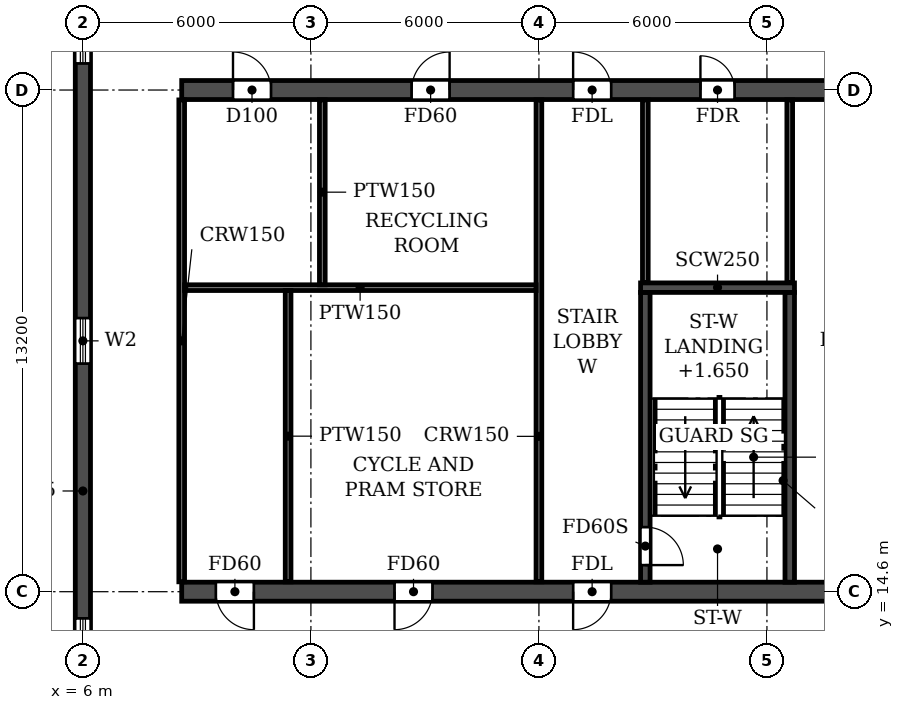
"""IFC4 building model, lengths in metres.
Left out: names, types, materials, properties, quantities, classifications, styles, units other than length and angle.
Written with IfcOpenShell. Run it as: python <this file> out.ifc"""

import sys

from ifc_helpers import new_model, si_unit, direction, frame, frame_2d, origin, place, context, subcontext, project, spatial, rectangle, extrude, element, fill, save


model = new_model("IFC4")
c1 = context("Model", 3, precision=1e-05, world=origin(), true_north=direction((0.0, 1.0)))
c2 = subcontext(c1, "Body", "Model", "MODEL_VIEW")
j1 = project(units=[si_unit("LENGTHUNIT", "METRE"), si_unit("PLANEANGLEUNIT", "RADIAN")], contexts=[c1])
p1 = place(None, origin())
s1 = spatial("IfcSite", under=j1, at=p1, CompositionType="ELEMENT")
p2 = place(p1, origin())
s2 = spatial("IfcBuilding", under=s1, at=p2, CompositionType="ELEMENT")
p3 = place(p2, frame((0.0, 0.0, 102.6)))
s3 = spatial("IfcBuildingStorey", under=s2, at=p3, CompositionType="ELEMENT", Elevation=102.6)
p4 = place(p3, frame((6.0, 4.683, 0.0), z_axis=(0.0, 0.0, 1.0), x_axis=(0.0, 1.0, 0.0)))
e1 = element("IfcWall", 1, at=p4, inside=s3, PredefinedType="SHEAR", context=c2, shape_type="SweptSolid", body=[
    extrude(rectangle(XDim=34.234, YDim=0.4, at=frame_2d((17.117, 0.0))), origin(), (0.0, 0.0, 1.0), 3.0),
])
p5 = place(p4, frame((23.817, 0.0, 0.9)))
e2 = element("IfcOpeningElement", 2, at=p5, cuts=e1, PredefinedType="OPENING", context=c2, shape_type="SweptSolid", body=[
    extrude(rectangle(XDim=1.2, YDim=1.5, at=frame_2d((0.6, 0.75))), frame((0.0, 0.21, 0.0), z_axis=(0.0, -1.0, 0.0), x_axis=(1.0, 0.0, 0.0)), (0.0, 0.0, 1.0), 0.42),
])
p6 = place(p4, frame((8.017, 0.0, 0.9)))
e3 = element("IfcOpeningElement", 3, at=p6, cuts=e1, PredefinedType="OPENING", context=c2, shape_type="SweptSolid", body=[
    extrude(rectangle(XDim=1.2, YDim=1.5, at=frame_2d((0.6, 0.75))), frame((0.0, 0.21, 0.0), z_axis=(0.0, -1.0, 0.0), x_axis=(1.0, 0.0, 0.0)), (0.0, 0.0, 1.0), 0.42),
])
p7 = place(p4, frame((15.917, 0.0, 0.9)))
e4 = element("IfcOpeningElement", 4, at=p7, cuts=e1, PredefinedType="OPENING", context=c2, shape_type="SweptSolid", body=[
    extrude(rectangle(XDim=1.2, YDim=1.5, at=frame_2d((0.6, 0.75))), frame((0.0, 0.21, 0.0), z_axis=(0.0, -1.0, 0.0), x_axis=(1.0, 0.0, 0.0)), (0.0, 0.0, 1.0), 0.42),
])
p8 = place(p4, frame((28.894, 0.0, 0.6)))
e5 = element("IfcOpeningElement", 5, at=p8, cuts=e1, PredefinedType="OPENING", context=c2, shape_type="SweptSolid", body=[
    extrude(rectangle(XDim=2.2, YDim=1.8, at=frame_2d((1.1, 0.9))), frame((0.0, 0.21, 0.0), z_axis=(0.0, -1.0, 0.0), x_axis=(1.0, 0.0, 0.0)), (0.0, 0.0, 1.0), 0.42),
])
p9 = place(p4, frame((2.541, 0.0, 0.6)))
e6 = element("IfcOpeningElement", 6, at=p9, cuts=e1, PredefinedType="OPENING", context=c2, shape_type="SweptSolid", body=[
    extrude(rectangle(XDim=2.2, YDim=1.8, at=frame_2d((1.1, 0.9))), frame((0.0, 0.21, 0.0), z_axis=(0.0, -1.0, 0.0), x_axis=(1.0, 0.0, 0.0)), (0.0, 0.0, 1.0), 0.42),
])
p10 = place(p3, frame((8.6, 14.6, 0.0), z_axis=(0.0, 0.0, 1.0), x_axis=(1.0, 0.0, 0.0)))
e7 = element("IfcWall", 7, at=p10, inside=s3, PredefinedType="SOLIDWALL", context=c2, shape_type="SweptSolid", body=[
    extrude(rectangle(XDim=84.8, YDim=0.5, at=frame_2d((42.4, 0.0))), origin(), (0.0, 0.0, 1.0), 3.0),
])
p11 = place(p10, frame((0.9, 0.0, 0.0)))
e8 = element("IfcOpeningElement", 8, at=p11, cuts=e7, PredefinedType="OPENING", context=c2, shape_type="SweptSolid", body=[
    extrude(rectangle(XDim=1.0, YDim=2.1, at=frame_2d((0.5, 1.05))), frame((0.0, 0.26, 0.0), z_axis=(0.0, -1.0, 0.0), x_axis=(1.0, 0.0, 0.0)), (0.0, 0.0, 1.0), 0.52),
])
p12 = place(p10, frame((5.6, 0.0, 0.0)))
e9 = element("IfcOpeningElement", 9, at=p12, cuts=e7, PredefinedType="OPENING", context=c2, shape_type="SweptSolid", body=[
    extrude(rectangle(XDim=1.0, YDim=2.1, at=frame_2d((0.5, 1.05))), frame((0.0, 0.26, 0.0), z_axis=(0.0, -1.0, 0.0), x_axis=(1.0, 0.0, 0.0)), (0.0, 0.0, 1.0), 0.52),
])
p13 = place(p10, frame((10.3, 0.0, 0.0)))
e10 = element("IfcOpeningElement", 10, at=p13, cuts=e7, PredefinedType="OPENING", context=c2, shape_type="SweptSolid", body=[
    extrude(rectangle(XDim=1.0, YDim=2.1, at=frame_2d((0.5, 1.05))), frame((0.0, 0.26, 0.0), z_axis=(0.0, -1.0, 0.0), x_axis=(1.0, 0.0, 0.0)), (0.0, 0.0, 1.0), 0.52),
])
p14 = place(p10, frame((18.2, 0.0, 0.0)))
e11 = element("IfcOpeningElement", 11, at=p14, cuts=e7, PredefinedType="OPENING", context=c2, shape_type="SweptSolid", body=[
    extrude(rectangle(XDim=1.0, YDim=2.1, at=frame_2d((0.5, 1.05))), frame((0.0, 0.26, 0.0), z_axis=(0.0, -1.0, 0.0), x_axis=(1.0, 0.0, 0.0)), (0.0, 0.0, 1.0), 0.52),
])
p15 = place(p10, frame((22.8, 0.0, 0.0)))
e12 = element("IfcOpeningElement", 12, at=p15, cuts=e7, PredefinedType="OPENING", context=c2, shape_type="SweptSolid", body=[
    extrude(rectangle(XDim=1.0, YDim=2.1, at=frame_2d((0.5, 1.05))), frame((0.0, 0.26, 0.0), z_axis=(0.0, -1.0, 0.0), x_axis=(1.0, 0.0, 0.0)), (0.0, 0.0, 1.0), 0.52),
])
p16 = place(p10, frame((36.7, 0.0, 0.0)))
e13 = element("IfcOpeningElement", 13, at=p16, cuts=e7, PredefinedType="OPENING", context=c2, shape_type="SweptSolid", body=[
    extrude(rectangle(XDim=1.0, YDim=2.1, at=frame_2d((0.5, 1.05))), frame((0.0, 0.26, 0.0), z_axis=(0.0, -1.0, 0.0), x_axis=(1.0, 0.0, 0.0)), (0.0, 0.0, 1.0), 0.52),
])
p17 = place(p10, frame((41.9, 0.0, 0.0)))
e14 = element("IfcOpeningElement", 14, at=p17, cuts=e7, PredefinedType="OPENING", context=c2, shape_type="SweptSolid", body=[
    extrude(rectangle(XDim=1.0, YDim=2.1, at=frame_2d((0.5, 1.05))), frame((0.0, 0.26, 0.0), z_axis=(0.0, -1.0, 0.0), x_axis=(1.0, 0.0, 0.0)), (0.0, 0.0, 1.0), 0.52),
])
p18 = place(p10, frame((47.1, 0.0, 0.0)))
e15 = element("IfcOpeningElement", 15, at=p18, cuts=e7, PredefinedType="OPENING", context=c2, shape_type="SweptSolid", body=[
    extrude(rectangle(XDim=1.0, YDim=2.1, at=frame_2d((0.5, 1.05))), frame((0.0, 0.26, 0.0), z_axis=(0.0, -1.0, 0.0), x_axis=(1.0, 0.0, 0.0)), (0.0, 0.0, 1.0), 0.52),
])
p19 = place(p10, frame((61.0, 0.0, 0.0)))
e16 = element("IfcOpeningElement", 16, at=p19, cuts=e7, PredefinedType="OPENING", context=c2, shape_type="SweptSolid", body=[
    extrude(rectangle(XDim=1.0, YDim=2.1, at=frame_2d((0.5, 1.05))), frame((0.0, 0.26, 0.0), z_axis=(0.0, -1.0, 0.0), x_axis=(1.0, 0.0, 0.0)), (0.0, 0.0, 1.0), 0.52),
])
p20 = place(p10, frame((65.6, 0.0, 0.0)))
e17 = element("IfcOpeningElement", 17, at=p20, cuts=e7, PredefinedType="OPENING", context=c2, shape_type="SweptSolid", body=[
    extrude(rectangle(XDim=1.0, YDim=2.1, at=frame_2d((0.5, 1.05))), frame((0.0, 0.26, 0.0), z_axis=(0.0, -1.0, 0.0), x_axis=(1.0, 0.0, 0.0)), (0.0, 0.0, 1.0), 0.52),
])
p21 = place(p10, frame((73.5, 0.0, 0.0)))
e18 = element("IfcOpeningElement", 18, at=p21, cuts=e7, PredefinedType="OPENING", context=c2, shape_type="SweptSolid", body=[
    extrude(rectangle(XDim=1.0, YDim=2.1, at=frame_2d((0.5, 1.05))), frame((0.0, 0.26, 0.0), z_axis=(0.0, -1.0, 0.0), x_axis=(1.0, 0.0, 0.0)), (0.0, 0.0, 1.0), 0.52),
])
p22 = place(p10, frame((79.6, 0.0, 0.0)))
e19 = element("IfcOpeningElement", 19, at=p22, cuts=e7, PredefinedType="OPENING", context=c2, shape_type="SweptSolid", body=[
    extrude(rectangle(XDim=1.0, YDim=2.1, at=frame_2d((0.5, 1.05))), frame((0.0, 0.26, 0.0), z_axis=(0.0, -1.0, 0.0), x_axis=(1.0, 0.0, 0.0)), (0.0, 0.0, 1.0), 0.52),
])
p23 = place(p3, frame((8.6, 27.8, 0.0), z_axis=(0.0, 0.0, 1.0), x_axis=(1.0, 0.0, 0.0)))
e20 = element("IfcWall", 20, at=p23, inside=s3, PredefinedType="SOLIDWALL", context=c2, shape_type="SweptSolid", body=[
    extrude(rectangle(XDim=84.8, YDim=0.5, at=frame_2d((42.4, 0.0))), origin(), (0.0, 0.0, 1.0), 3.0),
])
p24 = place(p23, frame((1.35, 0.0, 0.0)))
e21 = element("IfcOpeningElement", 21, at=p24, cuts=e20, PredefinedType="OPENING", context=c2, shape_type="SweptSolid", body=[
    extrude(rectangle(XDim=1.0, YDim=2.1, at=frame_2d((0.5, 1.05))), frame((0.0, 0.26, 0.0), z_axis=(0.0, -1.0, 0.0), x_axis=(1.0, 0.0, 0.0)), (0.0, 0.0, 1.0), 0.52),
])
p25 = place(p23, frame((6.05, 0.0, 0.0)))
e22 = element("IfcOpeningElement", 22, at=p25, cuts=e20, PredefinedType="OPENING", context=c2, shape_type="SweptSolid", body=[
    extrude(rectangle(XDim=1.0, YDim=2.1, at=frame_2d((0.5, 1.05))), frame((0.0, 0.26, 0.0), z_axis=(0.0, -1.0, 0.0), x_axis=(1.0, 0.0, 0.0)), (0.0, 0.0, 1.0), 0.52),
])
p26 = place(p23, frame((10.3, 0.0, 0.0)))
e23 = element("IfcOpeningElement", 23, at=p26, cuts=e20, PredefinedType="OPENING", context=c2, shape_type="SweptSolid", body=[
    extrude(rectangle(XDim=1.0, YDim=2.1, at=frame_2d((0.5, 1.05))), frame((0.0, 0.26, 0.0), z_axis=(0.0, -1.0, 0.0), x_axis=(1.0, 0.0, 0.0)), (0.0, 0.0, 1.0), 0.52),
])
p27 = place(p23, frame((13.65, 0.0, 0.0)))
e24 = element("IfcOpeningElement", 24, at=p27, cuts=e20, PredefinedType="OPENING", context=c2, shape_type="SweptSolid", body=[
    extrude(rectangle(XDim=0.9, YDim=2.1, at=frame_2d((0.45, 1.05))), frame((0.0, 0.26, 0.0), z_axis=(0.0, -1.0, 0.0), x_axis=(1.0, 0.0, 0.0)), (0.0, 0.0, 1.0), 0.52),
])
p28 = place(p23, frame((22.85, 0.0, 0.0)))
e25 = element("IfcOpeningElement", 25, at=p28, cuts=e20, PredefinedType="OPENING", context=c2, shape_type="SweptSolid", body=[
    extrude(rectangle(XDim=0.9, YDim=2.1, at=frame_2d((0.45, 1.05))), frame((0.0, 0.26, 0.0), z_axis=(0.0, -1.0, 0.0), x_axis=(1.0, 0.0, 0.0)), (0.0, 0.0, 1.0), 0.52),
])
p29 = place(p23, frame((28.6, 0.0, 0.0)))
e26 = element("IfcOpeningElement", 26, at=p29, cuts=e20, PredefinedType="OPENING", context=c2, shape_type="SweptSolid", body=[
    extrude(rectangle(XDim=1.0, YDim=2.1, at=frame_2d((0.5, 1.05))), frame((0.0, 0.26, 0.0), z_axis=(0.0, -1.0, 0.0), x_axis=(1.0, 0.0, 0.0)), (0.0, 0.0, 1.0), 0.52),
])
p30 = place(p23, frame((33.8, 0.0, 0.0)))
e27 = element("IfcOpeningElement", 27, at=p30, cuts=e20, PredefinedType="OPENING", context=c2, shape_type="SweptSolid", body=[
    extrude(rectangle(XDim=1.0, YDim=2.1, at=frame_2d((0.5, 1.05))), frame((0.0, 0.26, 0.0), z_axis=(0.0, -1.0, 0.0), x_axis=(1.0, 0.0, 0.0)), (0.0, 0.0, 1.0), 0.52),
])
p31 = place(p23, frame((39.0, 0.0, 0.0)))
e28 = element("IfcOpeningElement", 28, at=p31, cuts=e20, PredefinedType="OPENING", context=c2, shape_type="SweptSolid", body=[
    extrude(rectangle(XDim=1.0, YDim=2.1, at=frame_2d((0.5, 1.05))), frame((0.0, 0.26, 0.0), z_axis=(0.0, -1.0, 0.0), x_axis=(1.0, 0.0, 0.0)), (0.0, 0.0, 1.0), 0.52),
])
p32 = place(p23, frame((41.9, 0.0, 0.0)))
e29 = element("IfcOpeningElement", 29, at=p32, cuts=e20, PredefinedType="OPENING", context=c2, shape_type="SweptSolid", body=[
    extrude(rectangle(XDim=1.0, YDim=2.1, at=frame_2d((0.5, 1.05))), frame((0.0, 0.26, 0.0), z_axis=(0.0, -1.0, 0.0), x_axis=(1.0, 0.0, 0.0)), (0.0, 0.0, 1.0), 0.52),
])
p33 = place(p23, frame((44.8, 0.0, 0.0)))
e30 = element("IfcOpeningElement", 30, at=p33, cuts=e20, PredefinedType="OPENING", context=c2, shape_type="SweptSolid", body=[
    extrude(rectangle(XDim=1.0, YDim=2.1, at=frame_2d((0.5, 1.05))), frame((0.0, 0.26, 0.0), z_axis=(0.0, -1.0, 0.0), x_axis=(1.0, 0.0, 0.0)), (0.0, 0.0, 1.0), 0.52),
])
p34 = place(p23, frame((48.7, 0.0, 0.0)))
e31 = element("IfcOpeningElement", 31, at=p34, cuts=e20, PredefinedType="OPENING", context=c2, shape_type="SweptSolid", body=[
    extrude(rectangle(XDim=1.0, YDim=2.1, at=frame_2d((0.5, 1.05))), frame((0.0, 0.26, 0.0), z_axis=(0.0, -1.0, 0.0), x_axis=(1.0, 0.0, 0.0)), (0.0, 0.0, 1.0), 0.52),
])
p35 = place(p23, frame((55.2, 0.0, 0.0)))
e32 = element("IfcOpeningElement", 32, at=p35, cuts=e20, PredefinedType="OPENING", context=c2, shape_type="SweptSolid", body=[
    extrude(rectangle(XDim=1.0, YDim=2.1, at=frame_2d((0.5, 1.05))), frame((0.0, 0.26, 0.0), z_axis=(0.0, -1.0, 0.0), x_axis=(1.0, 0.0, 0.0)), (0.0, 0.0, 1.0), 0.52),
])
p36 = place(p23, frame((61.05, 0.0, 0.0)))
e33 = element("IfcOpeningElement", 33, at=p36, cuts=e20, PredefinedType="OPENING", context=c2, shape_type="SweptSolid", body=[
    extrude(rectangle(XDim=0.9, YDim=2.1, at=frame_2d((0.45, 1.05))), frame((0.0, 0.26, 0.0), z_axis=(0.0, -1.0, 0.0), x_axis=(1.0, 0.0, 0.0)), (0.0, 0.0, 1.0), 0.52),
])
p37 = place(p23, frame((70.25, 0.0, 0.0)))
e34 = element("IfcOpeningElement", 34, at=p37, cuts=e20, PredefinedType="OPENING", context=c2, shape_type="SweptSolid", body=[
    extrude(rectangle(XDim=0.9, YDim=2.1, at=frame_2d((0.45, 1.05))), frame((0.0, 0.26, 0.0), z_axis=(0.0, -1.0, 0.0), x_axis=(1.0, 0.0, 0.0)), (0.0, 0.0, 1.0), 0.52),
])
p38 = place(p23, frame((73.5, 0.0, 0.0)))
e35 = element("IfcOpeningElement", 35, at=p38, cuts=e20, PredefinedType="OPENING", context=c2, shape_type="SweptSolid", body=[
    extrude(rectangle(XDim=1.0, YDim=2.1, at=frame_2d((0.5, 1.05))), frame((0.0, 0.26, 0.0), z_axis=(0.0, -1.0, 0.0), x_axis=(1.0, 0.0, 0.0)), (0.0, 0.0, 1.0), 0.52),
])
p39 = place(p23, frame((77.95, 0.0, 0.0)))
e36 = element("IfcOpeningElement", 36, at=p39, cuts=e20, PredefinedType="OPENING", context=c2, shape_type="SweptSolid", body=[
    extrude(rectangle(XDim=1.5, YDim=2.1, at=frame_2d((0.75, 1.05))), frame((0.0, 0.26, 0.0), z_axis=(0.0, -1.0, 0.0), x_axis=(1.0, 0.0, 0.0)), (0.0, 0.0, 1.0), 0.52),
])
p40 = place(p23, frame((82.9, 0.0, 0.0)))
e37 = element("IfcOpeningElement", 37, at=p40, cuts=e20, PredefinedType="OPENING", context=c2, shape_type="SweptSolid", body=[
    extrude(rectangle(XDim=1.0, YDim=2.1, at=frame_2d((0.5, 1.05))), frame((0.0, 0.26, 0.0), z_axis=(0.0, -1.0, 0.0), x_axis=(1.0, 0.0, 0.0)), (0.0, 0.0, 1.0), 0.52),
])
p41 = place(p3, frame((20.8, 14.85, 0.0), z_axis=(0.0, 0.0, 1.0), x_axis=(0.0, 1.0, 0.0)))
e38 = element("IfcWall", 38, at=p41, inside=s3, PredefinedType="SOLIDWALL", context=c2, shape_type="SweptSolid", body=[
    extrude(rectangle(XDim=7.625, YDim=0.25, at=frame_2d((3.812, 0.0))), origin(), (0.0, 0.0, 1.0), 3.0),
])
p42 = place(p41, frame((0.45, 0.0, 0.0)))
e39 = element("IfcOpeningElement", 39, at=p42, cuts=e38, PredefinedType="OPENING", context=c2, shape_type="SweptSolid", body=[
    extrude(rectangle(XDim=1.0, YDim=2.1, at=frame_2d((0.5, 1.05))), frame((0.0, 0.135, 0.0), z_axis=(0.0, -1.0, 0.0), x_axis=(1.0, 0.0, 0.0)), (0.0, 0.0, 1.0), 0.27),
])
p43 = place(p3, frame((24.6, 14.85, 0.0), z_axis=(0.0, 0.0, 1.0), x_axis=(0.0, 1.0, 0.0)))
e40 = element("IfcWall", 40, at=p43, inside=s3, PredefinedType="SOLIDWALL", context=c2, shape_type="SweptSolid", body=[
    extrude(rectangle(XDim=7.625, YDim=0.25, at=frame_2d((3.812, 0.0))), origin(), (0.0, 0.0, 1.0), 3.0),
])
p44 = place(p3, frame((20.675, 22.6, 0.0), z_axis=(0.0, 0.0, 1.0), x_axis=(1.0, 0.0, 0.0)))
e41 = element("IfcWall", 41, at=p44, inside=s3, PredefinedType="SOLIDWALL", context=c2, shape_type="SweptSolid", body=[
    extrude(rectangle(XDim=4.05, YDim=0.25, at=frame_2d((2.025, 0.0))), origin(), (0.0, 0.0, 1.0), 3.0),
])
for number, where, z_axis, x_axis in (
    (42, (8.6, 14.86, 0.0), (0.0, 0.0, 1.0), (0.0, 1.0, 0.0)),
    (43, (18.0, 14.86, 0.0), (0.0, 0.0, 1.0), (0.0, 1.0, 0.0)),
):
    element("IfcWall", number, at=place(p3, frame(where, z_axis=z_axis, x_axis=x_axis)), inside=s3, PredefinedType="PARTITIONING", context=c2, shape_type="SweptSolid", body=[
        extrude(rectangle(XDim=12.68, YDim=0.15, at=frame_2d((6.34, 0.0))), origin(), (0.0, 0.0, 1.0), 3.0),
    ])
p45 = place(p3, frame((8.675, 22.6, 0.0), z_axis=(0.0, 0.0, 1.0), x_axis=(1.0, 0.0, 0.0)))
e44 = element("IfcWall", 44, at=p45, inside=s3, PredefinedType="PARTITIONING", context=c2, shape_type="SweptSolid", body=[
    extrude(rectangle(XDim=9.25, YDim=0.15, at=frame_2d((4.625, 0.0))), origin(), (0.0, 0.0, 1.0), 3.0),
])
p46 = place(p3, frame((11.4, 14.86, 0.0), z_axis=(0.0, 0.0, 1.0), x_axis=(0.0, 1.0, 0.0)))
e45 = element("IfcWall", 45, at=p46, inside=s3, PredefinedType="PARTITIONING", context=c2, shape_type="SweptSolid", body=[
    extrude(rectangle(XDim=7.665, YDim=0.15, at=frame_2d((3.833, 0.0))), origin(), (0.0, 0.0, 1.0), 3.0),
])
p47 = place(p3, frame((12.3, 22.675, 0.0), z_axis=(0.0, 0.0, 1.0), x_axis=(0.0, 1.0, 0.0)))
e46 = element("IfcWall", 46, at=p47, inside=s3, PredefinedType="PARTITIONING", context=c2, shape_type="SweptSolid", body=[
    extrude(rectangle(XDim=4.865, YDim=0.15, at=frame_2d((2.433, 0.0))), origin(), (0.0, 0.0, 1.0), 3.0),
])
for number, where, z_axis, x_axis in (
    (47, (20.8, 22.735, 0.0), (0.0, 0.0, 1.0), (0.0, 1.0, 0.0)),
    (48, (24.6, 22.735, 0.0), (0.0, 0.0, 1.0), (0.0, 1.0, 0.0)),
):
    element("IfcWall", number, at=place(p3, frame(where, z_axis=z_axis, x_axis=x_axis)), inside=s3, PredefinedType="PARTITIONING", context=c2, shape_type="SweptSolid", body=[
        extrude(rectangle(XDim=4.805, YDim=0.15, at=frame_2d((2.402, 0.0))), origin(), (0.0, 0.0, 1.0), 3.0),
    ])
p48 = place(p5, origin())
e49 = element("IfcWindow", 49, at=p48, inside=s3, PartitioningType="SINGLE_PANEL", PredefinedType="WINDOW", context=c2, shape_type="SweptSolid", body=[
    extrude(rectangle(XDim=1.2, YDim=1.5, at=frame_2d((0.6, 0.75))), frame((0.0, 0.03, 0.0), z_axis=(0.0, -1.0, 0.0), x_axis=(1.0, 0.0, 0.0)), (0.0, 0.0, 1.0), 0.06),
])
fill(e2, e49)
p49 = place(p6, origin())
e50 = element("IfcWindow", 50, at=p49, inside=s3, PartitioningType="SINGLE_PANEL", PredefinedType="WINDOW", context=c2, shape_type="SweptSolid", body=[
    extrude(rectangle(XDim=1.2, YDim=1.5, at=frame_2d((0.6, 0.75))), frame((0.0, 0.03, 0.0), z_axis=(0.0, -1.0, 0.0), x_axis=(1.0, 0.0, 0.0)), (0.0, 0.0, 1.0), 0.06),
])
fill(e3, e50)
p50 = place(p7, origin())
e51 = element("IfcWindow", 51, at=p50, inside=s3, PartitioningType="SINGLE_PANEL", PredefinedType="WINDOW", context=c2, shape_type="SweptSolid", body=[
    extrude(rectangle(XDim=1.2, YDim=1.5, at=frame_2d((0.6, 0.75))), frame((0.0, 0.03, 0.0), z_axis=(0.0, -1.0, 0.0), x_axis=(1.0, 0.0, 0.0)), (0.0, 0.0, 1.0), 0.06),
])
fill(e4, e51)
p51 = place(p24, origin())
e52 = element("IfcDoor", 52, at=p51, inside=s3, OperationType="SINGLE_SWING_LEFT", PredefinedType="DOOR", context=c2, shape_type="SweptSolid", body=[
    extrude(rectangle(XDim=1.0, YDim=2.1, at=frame_2d((0.5, 1.05))), frame((0.0, 0.025, 0.0), z_axis=(0.0, -1.0, 0.0), x_axis=(1.0, 0.0, 0.0)), (0.0, 0.0, 1.0), 0.05),
])
fill(e21, e52)
p52 = place(p25, origin())
e53 = element("IfcDoor", 53, at=p52, inside=s3, OperationType="SINGLE_SWING_RIGHT", PredefinedType="DOOR", context=c2, shape_type="SweptSolid", body=[
    extrude(rectangle(XDim=1.0, YDim=2.1, at=frame_2d((0.5, 1.05))), frame((0.0, 0.025, 0.0), z_axis=(0.0, -1.0, 0.0), x_axis=(1.0, 0.0, 0.0)), (0.0, 0.0, 1.0), 0.05),
])
fill(e22, e53)
p53 = place(p26, origin())
e54 = element("IfcDoor", 54, at=p53, inside=s3, OperationType="SINGLE_SWING_LEFT", PredefinedType="DOOR", context=c2, shape_type="SweptSolid", body=[
    extrude(rectangle(XDim=1.0, YDim=2.1, at=frame_2d((0.5, 1.05))), frame((0.0, 0.025, 0.0), z_axis=(0.0, -1.0, 0.0), x_axis=(1.0, 0.0, 0.0)), (0.0, 0.0, 1.0), 0.05),
])
fill(e23, e54)
p54 = place(p27, origin())
e55 = element("IfcDoor", 55, at=p54, inside=s3, OperationType="SINGLE_SWING_LEFT", PredefinedType="DOOR", context=c2, shape_type="SweptSolid", body=[
    extrude(rectangle(XDim=0.9, YDim=2.1, at=frame_2d((0.45, 1.05))), frame((0.0, 0.025, 0.0), z_axis=(0.0, -1.0, 0.0), x_axis=(1.0, 0.0, 0.0)), (0.0, 0.0, 1.0), 0.05),
])
fill(e24, e55)
p55 = place(p11, frame((1.0, 0.0, 0.0), z_axis=(0.0, 0.0, 1.0), x_axis=(-1.0, 0.0, 0.0)))
e56 = element("IfcDoor", 56, at=p55, inside=s3, OperationType="SINGLE_SWING_LEFT", PredefinedType="DOOR", context=c2, shape_type="SweptSolid", body=[
    extrude(rectangle(XDim=1.0, YDim=2.1, at=frame_2d((0.5, 1.05))), frame((0.0, 0.025, 0.0), z_axis=(0.0, -1.0, 0.0), x_axis=(1.0, 0.0, 0.0)), (0.0, 0.0, 1.0), 0.05),
])
fill(e8, e56)
p56 = place(p12, frame((1.0, 0.0, 0.0), z_axis=(0.0, 0.0, 1.0), x_axis=(-1.0, 0.0, 0.0)))
e57 = element("IfcDoor", 57, at=p56, inside=s3, OperationType="SINGLE_SWING_RIGHT", PredefinedType="DOOR", context=c2, shape_type="SweptSolid", body=[
    extrude(rectangle(XDim=1.0, YDim=2.1, at=frame_2d((0.5, 1.05))), frame((0.0, 0.025, 0.0), z_axis=(0.0, -1.0, 0.0), x_axis=(1.0, 0.0, 0.0)), (0.0, 0.0, 1.0), 0.05),
])
fill(e9, e57)
p57 = place(p13, frame((1.0, 0.0, 0.0), z_axis=(0.0, 0.0, 1.0), x_axis=(-1.0, 0.0, 0.0)))
e58 = element("IfcDoor", 58, at=p57, inside=s3, OperationType="SINGLE_SWING_RIGHT", PredefinedType="DOOR", context=c2, shape_type="SweptSolid", body=[
    extrude(rectangle(XDim=1.0, YDim=2.1, at=frame_2d((0.5, 1.05))), frame((0.0, 0.025, 0.0), z_axis=(0.0, -1.0, 0.0), x_axis=(1.0, 0.0, 0.0)), (0.0, 0.0, 1.0), 0.05),
])
fill(e10, e58)
p58 = place(p42, frame((1.0, 0.0, 0.0), z_axis=(0.0, 0.0, 1.0), x_axis=(-1.0, 0.0, 0.0)))
e59 = element("IfcDoor", 59, at=p58, inside=s3, OperationType="SINGLE_SWING_RIGHT", PredefinedType="DOOR", context=c2, shape_type="SweptSolid", body=[
    extrude(rectangle(XDim=1.0, YDim=2.1, at=frame_2d((0.5, 1.05))), frame((0.0, 0.025, 0.0), z_axis=(0.0, -1.0, 0.0), x_axis=(1.0, 0.0, 0.0)), (0.0, 0.0, 1.0), 0.05),
])
fill(e39, e59)
save(model, sys.argv[1])
